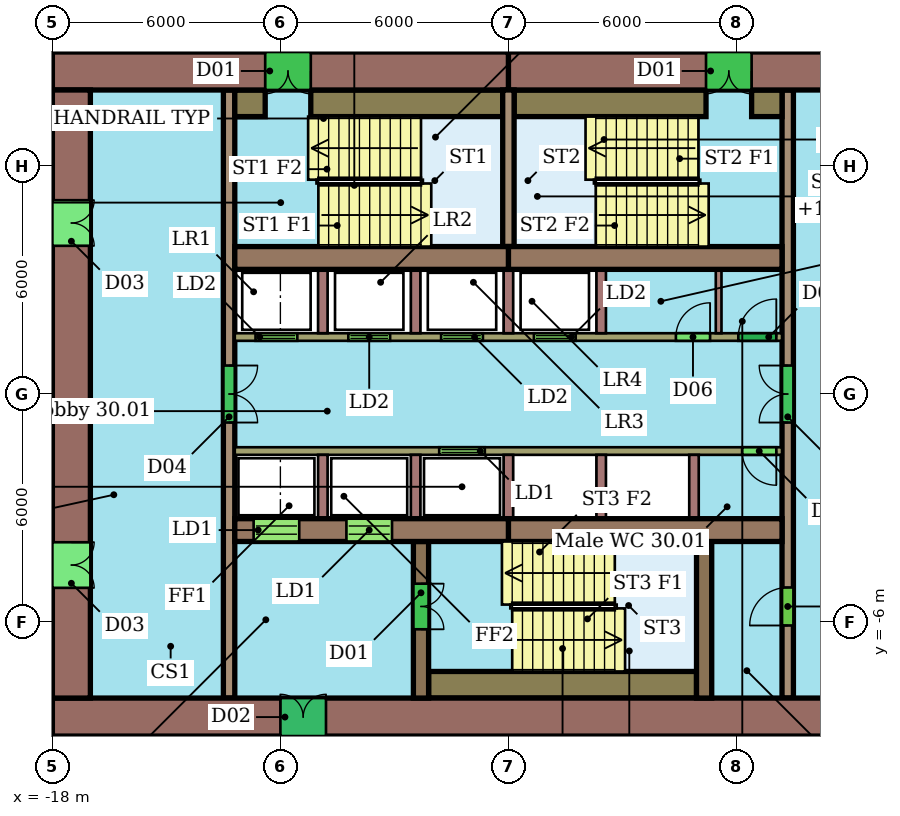
"""IFC4 building model, lengths in metres.
Left out: names, types, materials, properties, quantities, classifications, styles, units other than length and angle.
Written with IfcOpenShell. Run it as: python <this file> out.ifc"""

import sys

from ifc_helpers import new_model, si_unit, direction, frame, frame_2d, origin, place, context, subcontext, project, spatial, rectangle, extrude, element, fill, save


model = new_model("IFC4")
c1 = context("Model", 3, precision=1e-05, world=origin(), true_north=direction((0.0, 1.0)))
c2 = subcontext(c1, "Body", "Model", "MODEL_VIEW")
j1 = project(units=[si_unit("LENGTHUNIT", "METRE"), si_unit("PLANEANGLEUNIT", "RADIAN")], contexts=[c1])
p1 = place(None, origin())
s1 = spatial("IfcSite", under=j1, at=p1, CompositionType="ELEMENT")
p2 = place(p1, origin())
s2 = spatial("IfcBuilding", under=s1, at=p2, CompositionType="ELEMENT")
p3 = place(p2, frame((0.0, 0.0, 128.2)))
s3 = spatial("IfcBuildingStorey", under=s2, at=p3, CompositionType="ELEMENT", Elevation=128.2)
p4 = place(p3, frame((6.0, 8.5, 0.0), z_axis=(0.0, 0.0, 1.0), x_axis=(-1.0, 0.0, 0.0)))
e1 = element("IfcWall", 1, at=p4, inside=s3, PredefinedType="SHEAR", context=c2, shape_type="SweptSolid", body=[
    extrude(rectangle(XDim=12.0, YDim=1.0, at=frame_2d((6.0, 0.0))), origin(), (0.0, 0.0, 1.0), 3.3),
])
p5 = place(p4, frame((5.6, 0.0, 0.0)))
e2 = element("IfcOpeningElement", 2, at=p5, cuts=e1, PredefinedType="OPENING", context=c2, shape_type="SweptSolid", body=[
    extrude(rectangle(XDim=1.2, YDim=2.1, at=frame_2d((0.6, 1.05))), frame((0.0, 0.51, 0.0), z_axis=(0.0, -1.0, 0.0), x_axis=(1.0, 0.0, 0.0)), (0.0, 0.0, 1.0), 1.02),
])
p6 = place(p3, frame((-6.0, 8.5, 0.0), z_axis=(0.0, 0.0, 1.0), x_axis=(-1.0, 0.0, 0.0)))
e3 = element("IfcWall", 3, at=p6, inside=s3, PredefinedType="SHEAR", context=c2, shape_type="SweptSolid", body=[
    extrude(rectangle(XDim=12.0, YDim=1.0, at=frame_2d((6.0, 0.0))), origin(), (0.0, 0.0, 1.0), 3.3),
])
p7 = place(p6, frame((5.2, 0.0, 0.0)))
e4 = element("IfcOpeningElement", 4, at=p7, cuts=e3, PredefinedType="OPENING", context=c2, shape_type="SweptSolid", body=[
    extrude(rectangle(XDim=1.2, YDim=2.1, at=frame_2d((0.6, 1.05))), frame((0.0, 0.51, 0.0), z_axis=(0.0, -1.0, 0.0), x_axis=(1.0, 0.0, 0.0)), (0.0, 0.0, 1.0), 1.02),
])
p8 = place(p3, frame((-18.0, -8.5, 0.0), z_axis=(0.0, 0.0, 1.0), x_axis=(1.0, 0.0, 0.0)))
e5 = element("IfcWall", 5, at=p8, inside=s3, PredefinedType="SHEAR", context=c2, shape_type="SweptSolid", body=[
    extrude(rectangle(XDim=24.0, YDim=1.0, at=frame_2d((12.0, 0.0))), origin(), (0.0, 0.0, 1.0), 3.3),
])
p9 = place(p8, frame((6.0, 0.0, 0.0)))
e6 = element("IfcOpeningElement", 6, at=p9, cuts=e5, PredefinedType="OPENING", context=c2, shape_type="SweptSolid", body=[
    extrude(rectangle(XDim=1.2, YDim=2.1, at=frame_2d((0.6, 1.05))), frame((0.0, 0.51, 0.0), z_axis=(0.0, -1.0, 0.0), x_axis=(1.0, 0.0, 0.0)), (0.0, 0.0, 1.0), 1.02),
])
p10 = place(p3, frame((-17.5, 8.0, 0.0), z_axis=(0.0, 0.0, 1.0), x_axis=(0.0, -1.0, 0.0)))
e7 = element("IfcWall", 7, at=p10, inside=s3, PredefinedType="SHEAR", context=c2, shape_type="SweptSolid", body=[
    extrude(rectangle(XDim=16.0, YDim=1.0, at=frame_2d((8.0, 0.0))), origin(), (0.0, 0.0, 1.0), 3.3),
])
p11 = place(p10, frame((11.9, 0.0, 0.0)))
e8 = element("IfcOpeningElement", 8, at=p11, cuts=e7, PredefinedType="OPENING", context=c2, shape_type="SweptSolid", body=[
    extrude(rectangle(XDim=1.2, YDim=2.1, at=frame_2d((0.6, 1.05))), frame((0.0, 0.51, 0.0), z_axis=(0.0, -1.0, 0.0), x_axis=(1.0, 0.0, 0.0)), (0.0, 0.0, 1.0), 1.02),
])
p12 = place(p10, frame((2.9, 0.0, 0.0)))
e9 = element("IfcOpeningElement", 9, at=p12, cuts=e7, PredefinedType="OPENING", context=c2, shape_type="SweptSolid", body=[
    extrude(rectangle(XDim=1.2, YDim=2.1, at=frame_2d((0.6, 1.05))), frame((0.0, 0.51, 0.0), z_axis=(0.0, -1.0, 0.0), x_axis=(1.0, 0.0, 0.0)), (0.0, 0.0, 1.0), 1.02),
])
for number, where, z_axis, x_axis in (
    (10, (-13.2, 3.58, 0.0), (0.0, 0.0, 1.0), (1.0, 0.0, 0.0)),
    (11, (-6.0, 3.58, 0.0), (0.0, 0.0, 1.0), (1.0, 0.0, 0.0)),
):
    element("IfcWall", number, at=place(p3, frame(where, z_axis=z_axis, x_axis=x_axis)), inside=s3, PredefinedType="SHEAR", context=c2, shape_type="SweptSolid", body=[
        extrude(rectangle(XDim=7.2, YDim=0.6, at=frame_2d((3.6, 0.0))), origin(), (0.0, 0.0, 1.0), 3.3),
    ])
p13 = place(p3, frame((-13.2, -3.58, 0.0), z_axis=(0.0, 0.0, 1.0), x_axis=(1.0, 0.0, 0.0)))
e12 = element("IfcWall", 12, at=p13, inside=s3, PredefinedType="SHEAR", context=c2, shape_type="SweptSolid", body=[
    extrude(rectangle(XDim=7.2, YDim=0.6, at=frame_2d((3.6, 0.0))), origin(), (0.0, 0.0, 1.0), 3.3),
])
p14 = place(p13, frame((0.496, 0.0, 0.0)))
e13 = element("IfcOpeningElement", 13, at=p14, cuts=e12, PredefinedType="OPENING", context=c2, shape_type="SweptSolid", body=[
    extrude(rectangle(XDim=1.2, YDim=2.1, at=frame_2d((0.6, 1.05))), frame((0.0, 0.31, 0.0), z_axis=(0.0, -1.0, 0.0), x_axis=(1.0, 0.0, 0.0)), (0.0, 0.0, 1.0), 0.62),
])
p15 = place(p13, frame((2.938, 0.0, 0.0)))
e14 = element("IfcOpeningElement", 14, at=p15, cuts=e12, PredefinedType="OPENING", context=c2, shape_type="SweptSolid", body=[
    extrude(rectangle(XDim=1.2, YDim=2.1, at=frame_2d((0.6, 1.05))), frame((0.0, 0.31, 0.0), z_axis=(0.0, -1.0, 0.0), x_axis=(1.0, 0.0, 0.0)), (0.0, 0.0, 1.0), 0.62),
])
p16 = place(p3, frame((-6.0, -3.58, 0.0), z_axis=(0.0, 0.0, 1.0), x_axis=(1.0, 0.0, 0.0)))
e15 = element("IfcWall", 15, at=p16, inside=s3, PredefinedType="SHEAR", context=c2, shape_type="SweptSolid", body=[
    extrude(rectangle(XDim=7.2, YDim=0.6, at=frame_2d((3.6, 0.0))), origin(), (0.0, 0.0, 1.0), 3.3),
])
p17 = place(p3, frame((-13.35, 8.0, 0.0), z_axis=(0.0, 0.0, 1.0), x_axis=(0.0, -1.0, 0.0)))
e16 = element("IfcWall", 16, at=p17, inside=s3, PredefinedType="SHEAR", context=c2, shape_type="SweptSolid", body=[
    extrude(rectangle(XDim=16.0, YDim=0.3, at=frame_2d((8.0, 0.0))), origin(), (0.0, 0.0, 1.0), 3.3),
])
p18 = place(p17, frame((7.25, 0.0, 0.0)))
e17 = element("IfcOpeningElement", 17, at=p18, cuts=e16, PredefinedType="OPENING", context=c2, shape_type="SweptSolid", body=[
    extrude(rectangle(XDim=1.5, YDim=2.1, at=frame_2d((0.75, 1.05))), frame((0.0, 0.16, 0.0), z_axis=(0.0, -1.0, 0.0), x_axis=(1.0, 0.0, 0.0)), (0.0, 0.0, 1.0), 0.32),
])
p19 = place(p3, frame((1.35, -8.0, 0.0), z_axis=(0.0, 0.0, 1.0), x_axis=(0.0, 1.0, 0.0)))
e18 = element("IfcWall", 18, at=p19, inside=s3, PredefinedType="SHEAR", context=c2, shape_type="SweptSolid", body=[
    extrude(rectangle(XDim=16.0, YDim=0.3, at=frame_2d((8.0, 0.0))), origin(), (0.0, 0.0, 1.0), 3.3),
])
p20 = place(p19, frame((1.91, 0.0, 0.0)))
e19 = element("IfcOpeningElement", 19, at=p20, cuts=e18, PredefinedType="OPENING", context=c2, shape_type="SweptSolid", body=[
    extrude(rectangle(XDim=1.0, YDim=2.1, at=frame_2d((0.5, 1.05))), frame((0.0, 0.16, 0.0), z_axis=(0.0, -1.0, 0.0), x_axis=(1.0, 0.0, 0.0)), (0.0, 0.0, 1.0), 0.32),
])
p21 = place(p19, frame((7.25, 0.0, 0.0)))
e20 = element("IfcOpeningElement", 20, at=p21, cuts=e18, PredefinedType="OPENING", context=c2, shape_type="SweptSolid", body=[
    extrude(rectangle(XDim=1.5, YDim=2.1, at=frame_2d((0.75, 1.05))), frame((0.0, 0.16, 0.0), z_axis=(0.0, -1.0, 0.0), x_axis=(1.0, 0.0, 0.0)), (0.0, 0.0, 1.0), 0.32),
])
p22 = place(p3, frame((-13.2, 1.5, 0.0), z_axis=(0.0, 0.0, 1.0), x_axis=(1.0, 0.0, 0.0)))
e21 = element("IfcWall", 21, at=p22, inside=s3, PredefinedType="SHEAR", context=c2, shape_type="SweptSolid", body=[
    extrude(rectangle(XDim=14.4, YDim=0.2, at=frame_2d((7.2, 0.0))), origin(), (0.0, 0.0, 1.0), 3.3),
])
p23 = place(p22, frame((0.546, 0.0, 0.0)))
e22 = element("IfcOpeningElement", 22, at=p23, cuts=e21, PredefinedType="OPENING", context=c2, shape_type="SweptSolid", body=[
    extrude(rectangle(XDim=1.1, YDim=2.1, at=frame_2d((0.55, 1.05))), frame((0.0, 0.11, 0.0), z_axis=(0.0, -1.0, 0.0), x_axis=(1.0, 0.0, 0.0)), (0.0, 0.0, 1.0), 0.22),
])
p24 = place(p22, frame((2.988, 0.0, 0.0)))
e23 = element("IfcOpeningElement", 23, at=p24, cuts=e21, PredefinedType="OPENING", context=c2, shape_type="SweptSolid", body=[
    extrude(rectangle(XDim=1.1, YDim=2.1, at=frame_2d((0.55, 1.05))), frame((0.0, 0.11, 0.0), z_axis=(0.0, -1.0, 0.0), x_axis=(1.0, 0.0, 0.0)), (0.0, 0.0, 1.0), 0.22),
])
p25 = place(p22, frame((5.429, 0.0, 0.0)))
e24 = element("IfcOpeningElement", 24, at=p25, cuts=e21, PredefinedType="OPENING", context=c2, shape_type="SweptSolid", body=[
    extrude(rectangle(XDim=1.1, YDim=2.1, at=frame_2d((0.55, 1.05))), frame((0.0, 0.11, 0.0), z_axis=(0.0, -1.0, 0.0), x_axis=(1.0, 0.0, 0.0)), (0.0, 0.0, 1.0), 0.22),
])
p26 = place(p22, frame((7.871, 0.0, 0.0)))
e25 = element("IfcOpeningElement", 25, at=p26, cuts=e21, PredefinedType="OPENING", context=c2, shape_type="SweptSolid", body=[
    extrude(rectangle(XDim=1.1, YDim=2.1, at=frame_2d((0.55, 1.05))), frame((0.0, 0.11, 0.0), z_axis=(0.0, -1.0, 0.0), x_axis=(1.0, 0.0, 0.0)), (0.0, 0.0, 1.0), 0.22),
])
p27 = place(p22, frame((11.607, 0.0, 0.0)))
e26 = element("IfcOpeningElement", 26, at=p27, cuts=e21, PredefinedType="OPENING", context=c2, shape_type="SweptSolid", body=[
    extrude(rectangle(XDim=0.9, YDim=2.1, at=frame_2d((0.45, 1.05))), frame((0.0, 0.11, 0.0), z_axis=(0.0, -1.0, 0.0), x_axis=(1.0, 0.0, 0.0)), (0.0, 0.0, 1.0), 0.22),
])
p28 = place(p22, frame((13.25, 0.0, 0.0)))
e27 = element("IfcOpeningElement", 27, at=p28, cuts=e21, PredefinedType="OPENING", context=c2, shape_type="SweptSolid", body=[
    extrude(rectangle(XDim=1.0, YDim=2.1, at=frame_2d((0.5, 1.05))), frame((0.0, 0.11, 0.0), z_axis=(0.0, -1.0, 0.0), x_axis=(1.0, 0.0, 0.0)), (0.0, 0.0, 1.0), 0.22),
])
p29 = place(p3, frame((1.2, -1.5, 0.0), z_axis=(0.0, 0.0, 1.0), x_axis=(-1.0, 0.0, 0.0)))
e28 = element("IfcWall", 28, at=p29, inside=s3, PredefinedType="SHEAR", context=c2, shape_type="SweptSolid", body=[
    extrude(rectangle(XDim=14.4, YDim=0.2, at=frame_2d((7.2, 0.0))), origin(), (0.0, 0.0, 1.0), 3.3),
])
p30 = place(p29, frame((7.821, 0.0, 0.0)))
e29 = element("IfcOpeningElement", 29, at=p30, cuts=e28, PredefinedType="OPENING", context=c2, shape_type="SweptSolid", body=[
    extrude(rectangle(XDim=1.2, YDim=2.1, at=frame_2d((0.6, 1.05))), frame((0.0, 0.11, 0.0), z_axis=(0.0, -1.0, 0.0), x_axis=(1.0, 0.0, 0.0)), (0.0, 0.0, 1.0), 0.22),
])
p31 = place(p29, frame((0.15, 0.0, 0.0)))
e30 = element("IfcOpeningElement", 30, at=p31, cuts=e28, PredefinedType="OPENING", context=c2, shape_type="SweptSolid", body=[
    extrude(rectangle(XDim=0.9, YDim=2.1, at=frame_2d((0.45, 1.05))), frame((0.0, 0.11, 0.0), z_axis=(0.0, -1.0, 0.0), x_axis=(1.0, 0.0, 0.0)), (0.0, 0.0, 1.0), 0.22),
])
p32 = place(p3, frame((-8.3, -3.88, 0.0), z_axis=(0.0, 0.0, 1.0), x_axis=(0.0, -1.0, 0.0)))
e31 = element("IfcWall", 31, at=p32, inside=s3, PredefinedType="SHEAR", context=c2, shape_type="SweptSolid", body=[
    extrude(rectangle(XDim=4.12, YDim=0.4, at=frame_2d((2.06, 0.0))), origin(), (0.0, 0.0, 1.0), 3.3),
])
p33 = place(p32, frame((1.11, 0.0, 0.0)))
e32 = element("IfcOpeningElement", 32, at=p33, cuts=e31, PredefinedType="OPENING", context=c2, shape_type="SweptSolid", body=[
    extrude(rectangle(XDim=1.2, YDim=2.1, at=frame_2d((0.6, 1.05))), frame((0.0, 0.21, 0.0), z_axis=(0.0, -1.0, 0.0), x_axis=(1.0, 0.0, 0.0)), (0.0, 0.0, 1.0), 0.42),
])
p34 = place(p3, frame((-0.85, -3.88, 0.0), z_axis=(0.0, 0.0, 1.0), x_axis=(0.0, -1.0, 0.0)))
e33 = element("IfcWall", 33, at=p34, inside=s3, PredefinedType="SHEAR", context=c2, shape_type="SweptSolid", body=[
    extrude(rectangle(XDim=4.12, YDim=0.4, at=frame_2d((2.06, 0.0))), origin(), (0.0, 0.0, 1.0), 3.3),
])
p35 = place(p3, frame((-6.0, 3.88, 0.0), z_axis=(0.0, 0.0, 1.0), x_axis=(0.0, 1.0, 0.0)))
e34 = element("IfcWall", 34, at=p35, inside=s3, PredefinedType="SHEAR", context=c2, shape_type="SweptSolid", body=[
    extrude(rectangle(XDim=4.12, YDim=0.3, at=frame_2d((2.06, 0.0))), origin(), (0.0, 0.0, 1.0), 3.3),
])
p36 = place(p3, frame((-13.2, 7.65, 0.0), z_axis=(0.0, 0.0, 1.0), x_axis=(1.0, 0.0, 0.0)))
e35 = element("IfcWall", 35, at=p36, inside=s3, PredefinedType="SHEAR", context=c2, shape_type="SweptSolid", body=[
    extrude(rectangle(XDim=0.8, YDim=0.7, at=frame_2d((0.4, 0.0))), origin(), (0.0, 0.0, 1.0), 3.3),
])
for number, where, z_axis, x_axis in (
    (36, (-11.2, 7.65, 0.0), (0.0, 0.0, 1.0), (1.0, 0.0, 0.0)),
    (37, (-5.85, 7.65, 0.0), (0.0, 0.0, 1.0), (1.0, 0.0, 0.0)),
):
    element("IfcWall", number, at=place(p3, frame(where, z_axis=z_axis, x_axis=x_axis)), inside=s3, PredefinedType="SHEAR", context=c2, shape_type="SweptSolid", body=[
        extrude(rectangle(XDim=5.05, YDim=0.7, at=frame_2d((2.525, 0.0))), origin(), (0.0, 0.0, 1.0), 3.3),
    ])
p37 = place(p3, frame((0.4, 7.65, 0.0), z_axis=(0.0, 0.0, 1.0), x_axis=(1.0, 0.0, 0.0)))
e38 = element("IfcWall", 38, at=p37, inside=s3, PredefinedType="SHEAR", context=c2, shape_type="SweptSolid", body=[
    extrude(rectangle(XDim=0.8, YDim=0.7, at=frame_2d((0.4, 0.0))), origin(), (0.0, 0.0, 1.0), 3.3),
])
p38 = place(p3, frame((-8.1, -7.65, 0.0), z_axis=(0.0, 0.0, 1.0), x_axis=(1.0, 0.0, 0.0)))
e39 = element("IfcWall", 39, at=p38, inside=s3, PredefinedType="SHEAR", context=c2, shape_type="SweptSolid", body=[
    extrude(rectangle(XDim=7.05, YDim=0.7, at=frame_2d((3.525, 0.0))), origin(), (0.0, 0.0, 1.0), 3.3),
])
for number, where, z_axis, x_axis in (
    (40, (-10.883, 1.6, 0.0), (0.0, 0.0, 1.0), (0.0, 1.0, 0.0)),
    (41, (-8.442, 1.6, 0.0), (0.0, 0.0, 1.0), (0.0, 1.0, 0.0)),
    (42, (-6.0, 1.6, 0.0), (0.0, 0.0, 1.0), (0.0, 1.0, 0.0)),
    (43, (-3.558, 1.6, 0.0), (0.0, 0.0, 1.0), (0.0, 1.0, 0.0)),
):
    element("IfcWall", number, at=place(p3, frame(where, z_axis=z_axis, x_axis=x_axis)), inside=s3, PredefinedType="SHEAR", context=c2, shape_type="SweptSolid", body=[
        extrude(rectangle(XDim=1.68, YDim=0.25, at=frame_2d((0.84, 0.0))), origin(), (0.0, 0.0, 1.0), 3.3),
    ])
p39 = place(p3, frame((-0.468, 1.6, 0.0), z_axis=(0.0, 0.0, 1.0), x_axis=(0.0, 1.0, 0.0)))
e44 = element("IfcWall", 44, at=p39, inside=s3, PredefinedType="PARTITIONING", context=c2, shape_type="SweptSolid", body=[
    extrude(rectangle(XDim=1.68, YDim=0.15, at=frame_2d((0.84, 0.0))), origin(), (0.0, 0.0, 1.0), 3.3),
])
for number, where, z_axis, x_axis in (
    (45, (-10.883, -1.6, 0.0), (0.0, 0.0, 1.0), (0.0, -1.0, 0.0)),
    (46, (-8.442, -1.6, 0.0), (0.0, 0.0, 1.0), (0.0, -1.0, 0.0)),
    (47, (-6.0, -1.6, 0.0), (0.0, 0.0, 1.0), (0.0, -1.0, 0.0)),
    (48, (-3.558, -1.6, 0.0), (0.0, 0.0, 1.0), (0.0, -1.0, 0.0)),
    (49, (-1.117, -1.6, 0.0), (0.0, 0.0, 1.0), (0.0, -1.0, 0.0)),
):
    element("IfcWall", number, at=place(p3, frame(where, z_axis=z_axis, x_axis=x_axis)), inside=s3, PredefinedType="SHEAR", context=c2, shape_type="SweptSolid", body=[
        extrude(rectangle(XDim=1.68, YDim=0.25, at=frame_2d((0.84, 0.0))), origin(), (0.0, 0.0, 1.0), 3.3),
    ])
p40 = place(p5, origin())
e50 = element("IfcDoor", 50, at=p40, inside=s3, OperationType="DOUBLE_DOOR_SINGLE_SWING", PredefinedType="NOTDEFINED", context=c2, shape_type="SweptSolid", body=[
    extrude(rectangle(XDim=1.2, YDim=2.1, at=frame_2d((0.6, 1.05))), frame((0.0, 0.025, 0.0), z_axis=(0.0, -1.0, 0.0), x_axis=(1.0, 0.0, 0.0)), (0.0, 0.0, 1.0), 0.05),
])
fill(e2, e50)
p41 = place(p7, origin())
e51 = element("IfcDoor", 51, at=p41, inside=s3, OperationType="DOUBLE_DOOR_SINGLE_SWING", PredefinedType="NOTDEFINED", context=c2, shape_type="SweptSolid", body=[
    extrude(rectangle(XDim=1.2, YDim=2.1, at=frame_2d((0.6, 1.05))), frame((0.0, 0.025, 0.0), z_axis=(0.0, -1.0, 0.0), x_axis=(1.0, 0.0, 0.0)), (0.0, 0.0, 1.0), 0.05),
])
fill(e4, e51)
p42 = place(p9, origin())
e52 = element("IfcDoor", 52, at=p42, inside=s3, OperationType="DOUBLE_DOOR_SINGLE_SWING", PredefinedType="NOTDEFINED", context=c2, shape_type="SweptSolid", body=[
    extrude(rectangle(XDim=1.2, YDim=2.1, at=frame_2d((0.6, 1.05))), frame((0.0, 0.025, 0.0), z_axis=(0.0, -1.0, 0.0), x_axis=(1.0, 0.0, 0.0)), (0.0, 0.0, 1.0), 0.05),
])
fill(e6, e52)
p43 = place(p11, origin())
e53 = element("IfcDoor", 53, at=p43, inside=s3, OperationType="DOUBLE_DOOR_SINGLE_SWING", PredefinedType="NOTDEFINED", context=c2, shape_type="SweptSolid", body=[
    extrude(rectangle(XDim=1.2, YDim=2.1, at=frame_2d((0.6, 1.05))), frame((0.0, 0.025, 0.0), z_axis=(0.0, -1.0, 0.0), x_axis=(1.0, 0.0, 0.0)), (0.0, 0.0, 1.0), 0.05),
])
fill(e8, e53)
p44 = place(p12, origin())
e54 = element("IfcDoor", 54, at=p44, inside=s3, OperationType="DOUBLE_DOOR_SINGLE_SWING", PredefinedType="NOTDEFINED", context=c2, shape_type="SweptSolid", body=[
    extrude(rectangle(XDim=1.2, YDim=2.1, at=frame_2d((0.6, 1.05))), frame((0.0, 0.025, 0.0), z_axis=(0.0, -1.0, 0.0), x_axis=(1.0, 0.0, 0.0)), (0.0, 0.0, 1.0), 0.05),
])
fill(e9, e54)
p45 = place(p14, origin())
e55 = element("IfcDoor", 55, at=p45, inside=s3, OperationType="DOUBLE_DOOR_SLIDING", PredefinedType="NOTDEFINED", context=c2, shape_type="SweptSolid", body=[
    extrude(rectangle(XDim=1.2, YDim=2.1, at=frame_2d((0.6, 1.05))), frame((0.0, 0.025, 0.0), z_axis=(0.0, -1.0, 0.0), x_axis=(1.0, 0.0, 0.0)), (0.0, 0.0, 1.0), 0.05),
])
fill(e13, e55)
p46 = place(p15, origin())
e56 = element("IfcDoor", 56, at=p46, inside=s3, OperationType="DOUBLE_DOOR_SLIDING", PredefinedType="NOTDEFINED", context=c2, shape_type="SweptSolid", body=[
    extrude(rectangle(XDim=1.2, YDim=2.1, at=frame_2d((0.6, 1.05))), frame((0.0, 0.025, 0.0), z_axis=(0.0, -1.0, 0.0), x_axis=(1.0, 0.0, 0.0)), (0.0, 0.0, 1.0), 0.05),
])
fill(e14, e56)
p47 = place(p18, origin())
e57 = element("IfcDoor", 57, at=p47, inside=s3, OperationType="DOUBLE_DOOR_SINGLE_SWING", PredefinedType="NOTDEFINED", context=c2, shape_type="SweptSolid", body=[
    extrude(rectangle(XDim=1.5, YDim=2.1, at=frame_2d((0.75, 1.05))), frame((0.0, 0.025, 0.0), z_axis=(0.0, -1.0, 0.0), x_axis=(1.0, 0.0, 0.0)), (0.0, 0.0, 1.0), 0.05),
])
fill(e17, e57)
p48 = place(p20, origin())
e58 = element("IfcDoor", 58, at=p48, inside=s3, OperationType="SINGLE_SWING_LEFT", PredefinedType="NOTDEFINED", context=c2, shape_type="SweptSolid", body=[
    extrude(rectangle(XDim=1.0, YDim=2.1, at=frame_2d((0.5, 1.05))), frame((0.0, 0.025, 0.0), z_axis=(0.0, -1.0, 0.0), x_axis=(1.0, 0.0, 0.0)), (0.0, 0.0, 1.0), 0.05),
])
fill(e19, e58)
p49 = place(p21, origin())
e59 = element("IfcDoor", 59, at=p49, inside=s3, OperationType="DOUBLE_DOOR_SINGLE_SWING", PredefinedType="NOTDEFINED", context=c2, shape_type="SweptSolid", body=[
    extrude(rectangle(XDim=1.5, YDim=2.1, at=frame_2d((0.75, 1.05))), frame((0.0, 0.025, 0.0), z_axis=(0.0, -1.0, 0.0), x_axis=(1.0, 0.0, 0.0)), (0.0, 0.0, 1.0), 0.05),
])
fill(e20, e59)
p50 = place(p23, origin())
e60 = element("IfcDoor", 60, at=p50, inside=s3, OperationType="DOUBLE_DOOR_SLIDING", PredefinedType="NOTDEFINED", context=c2, shape_type="SweptSolid", body=[
    extrude(rectangle(XDim=1.1, YDim=2.1, at=frame_2d((0.55, 1.05))), frame((0.0, 0.025, 0.0), z_axis=(0.0, -1.0, 0.0), x_axis=(1.0, 0.0, 0.0)), (0.0, 0.0, 1.0), 0.05),
])
fill(e22, e60)
p51 = place(p24, origin())
e61 = element("IfcDoor", 61, at=p51, inside=s3, OperationType="DOUBLE_DOOR_SLIDING", PredefinedType="NOTDEFINED", context=c2, shape_type="SweptSolid", body=[
    extrude(rectangle(XDim=1.1, YDim=2.1, at=frame_2d((0.55, 1.05))), frame((0.0, 0.025, 0.0), z_axis=(0.0, -1.0, 0.0), x_axis=(1.0, 0.0, 0.0)), (0.0, 0.0, 1.0), 0.05),
])
fill(e23, e61)
p52 = place(p25, origin())
e62 = element("IfcDoor", 62, at=p52, inside=s3, OperationType="DOUBLE_DOOR_SLIDING", PredefinedType="NOTDEFINED", context=c2, shape_type="SweptSolid", body=[
    extrude(rectangle(XDim=1.1, YDim=2.1, at=frame_2d((0.55, 1.05))), frame((0.0, 0.025, 0.0), z_axis=(0.0, -1.0, 0.0), x_axis=(1.0, 0.0, 0.0)), (0.0, 0.0, 1.0), 0.05),
])
fill(e24, e62)
p53 = place(p26, origin())
e63 = element("IfcDoor", 63, at=p53, inside=s3, OperationType="DOUBLE_DOOR_SLIDING", PredefinedType="NOTDEFINED", context=c2, shape_type="SweptSolid", body=[
    extrude(rectangle(XDim=1.1, YDim=2.1, at=frame_2d((0.55, 1.05))), frame((0.0, 0.025, 0.0), z_axis=(0.0, -1.0, 0.0), x_axis=(1.0, 0.0, 0.0)), (0.0, 0.0, 1.0), 0.05),
])
fill(e25, e63)
p54 = place(p27, origin())
e64 = element("IfcDoor", 64, at=p54, inside=s3, OperationType="SINGLE_SWING_RIGHT", PredefinedType="NOTDEFINED", context=c2, shape_type="SweptSolid", body=[
    extrude(rectangle(XDim=0.9, YDim=2.1, at=frame_2d((0.45, 1.05))), frame((0.0, 0.025, 0.0), z_axis=(0.0, -1.0, 0.0), x_axis=(1.0, 0.0, 0.0)), (0.0, 0.0, 1.0), 0.05),
])
fill(e26, e64)
p55 = place(p28, origin())
e65 = element("IfcDoor", 65, at=p55, inside=s3, OperationType="SINGLE_SWING_RIGHT", PredefinedType="NOTDEFINED", context=c2, shape_type="SweptSolid", body=[
    extrude(rectangle(XDim=1.0, YDim=2.1, at=frame_2d((0.5, 1.05))), frame((0.0, 0.025, 0.0), z_axis=(0.0, -1.0, 0.0), x_axis=(1.0, 0.0, 0.0)), (0.0, 0.0, 1.0), 0.05),
])
fill(e27, e65)
p56 = place(p30, origin())
e66 = element("IfcDoor", 66, at=p56, inside=s3, OperationType="DOUBLE_DOOR_SLIDING", PredefinedType="NOTDEFINED", context=c2, shape_type="SweptSolid", body=[
    extrude(rectangle(XDim=1.2, YDim=2.1, at=frame_2d((0.6, 1.05))), frame((0.0, 0.025, 0.0), z_axis=(0.0, -1.0, 0.0), x_axis=(1.0, 0.0, 0.0)), (0.0, 0.0, 1.0), 0.05),
])
fill(e29, e66)
p57 = place(p31, origin())
e67 = element("IfcDoor", 67, at=p57, inside=s3, OperationType="SINGLE_SWING_LEFT", PredefinedType="NOTDEFINED", context=c2, shape_type="SweptSolid", body=[
    extrude(rectangle(XDim=0.9, YDim=2.1, at=frame_2d((0.45, 1.05))), frame((0.0, 0.025, 0.0), z_axis=(0.0, -1.0, 0.0), x_axis=(1.0, 0.0, 0.0)), (0.0, 0.0, 1.0), 0.05),
])
fill(e30, e67)
p58 = place(p33, origin())
e68 = element("IfcDoor", 68, at=p58, inside=s3, OperationType="DOUBLE_DOOR_SINGLE_SWING", PredefinedType="NOTDEFINED", context=c2, shape_type="SweptSolid", body=[
    extrude(rectangle(XDim=1.2, YDim=2.1, at=frame_2d((0.6, 1.05))), frame((0.0, 0.025, 0.0), z_axis=(0.0, -1.0, 0.0), x_axis=(1.0, 0.0, 0.0)), (0.0, 0.0, 1.0), 0.05),
])
fill(e32, e68)
save(model, sys.argv[1])
